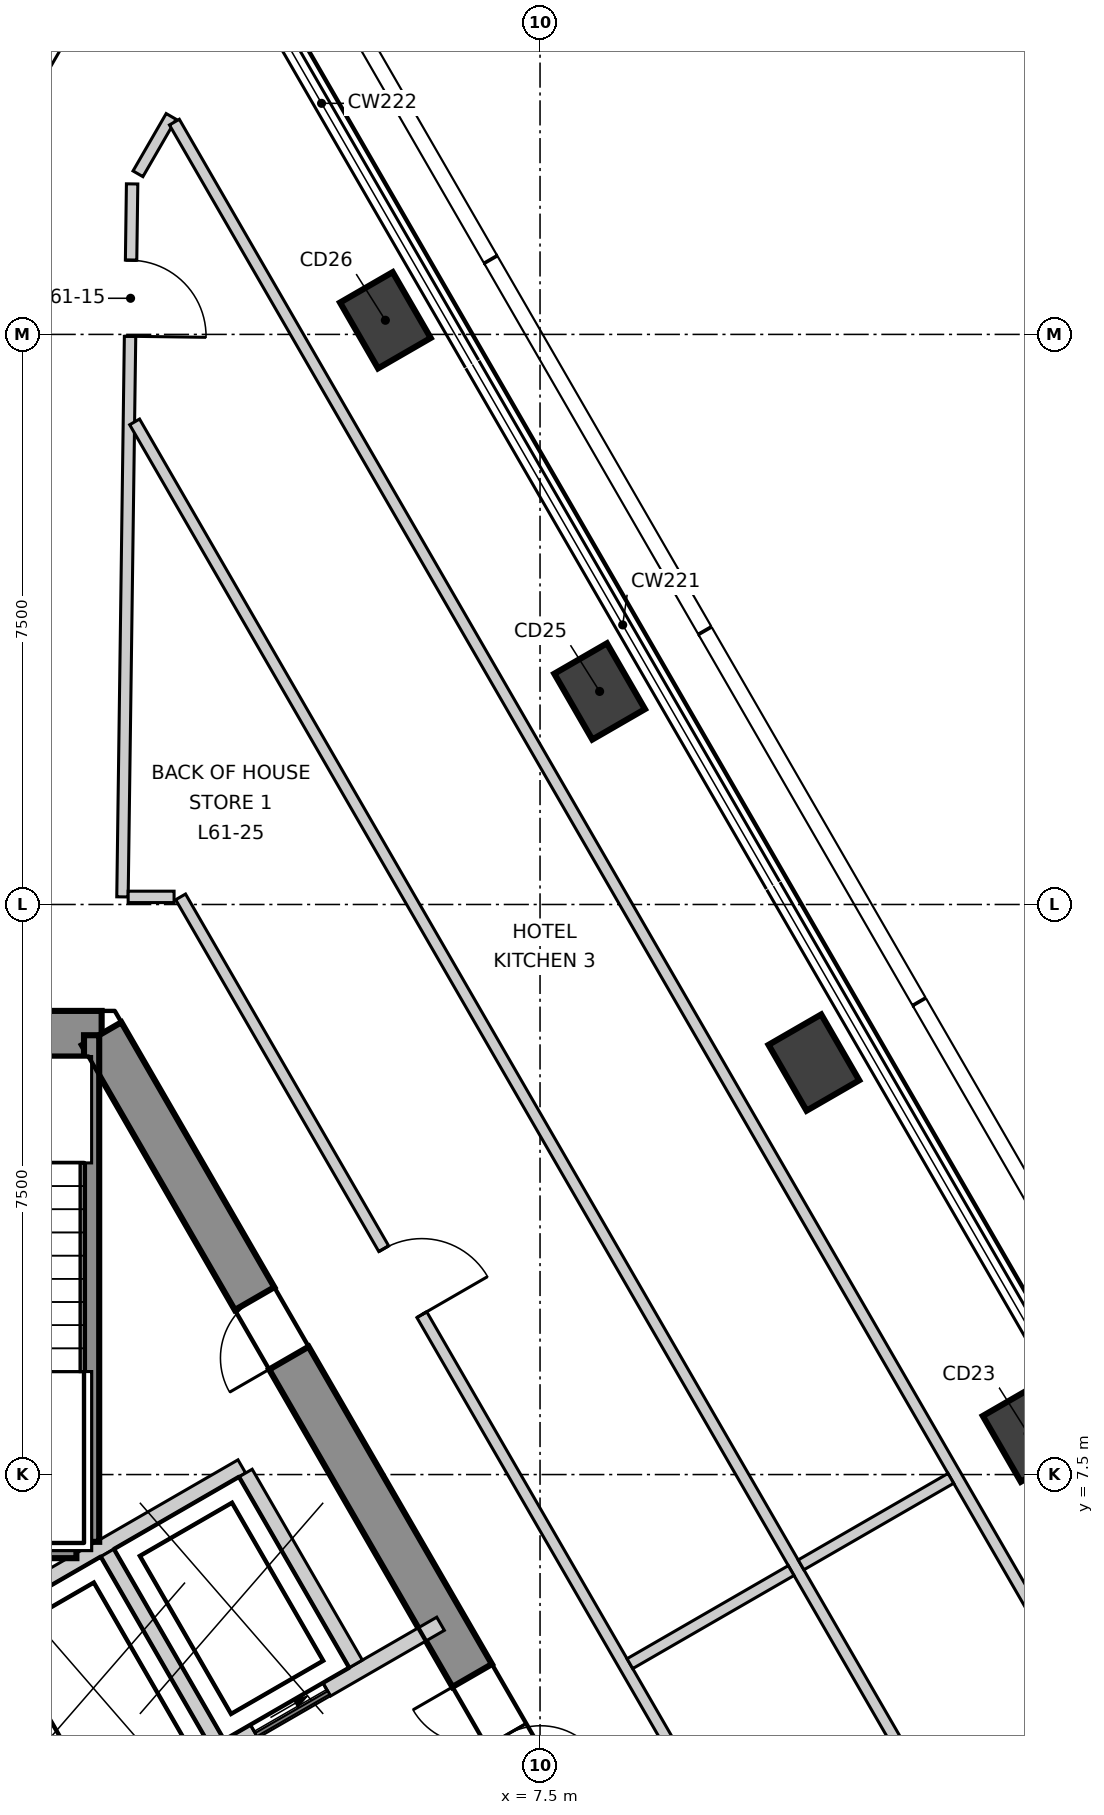
"""IFC4 building model, lengths in metres.
Left out: names, types, materials, properties, quantities, classifications, styles, units other than length and angle.
Written with IfcOpenShell. Run it as: python <this file> out.ifc"""

import sys

from ifc_helpers import new_model, si_unit, direction, frame, frame_2d, origin, origin_2d, place, context, subcontext, project, spatial, polyline, rectangle, outline, extrude, element, fill, save


model = new_model("IFC4")
c1 = context("Model", 3, precision=1e-05, world=origin(), true_north=direction((0.0, 1.0)))
c2 = subcontext(c1, "Body", "Model", "MODEL_VIEW")
j1 = project(units=[si_unit("LENGTHUNIT", "METRE"), si_unit("PLANEANGLEUNIT", "RADIAN")], contexts=[c1])
p1 = place(None, origin())
s1 = spatial("IfcSite", under=j1, at=p1, CompositionType="ELEMENT")
p2 = place(p1, origin())
s2 = spatial("IfcBuilding", under=s1, at=p2, CompositionType="ELEMENT")
p3 = place(p2, frame((0.0, 0.0, 261.8)))
s3 = spatial("IfcBuildingStorey", under=s2, at=p3, CompositionType="ELEMENT", Elevation=261.8)
p4 = place(p3, frame((1.732, 13.3, -0.3), z_axis=(0.0, 0.0, 1.0), x_axis=(-1.0, 0.0, 0.0)))
e1 = element("IfcWall", 1, at=p4, inside=s3, PredefinedType="SHEAR", context=c2, shape_type="SweptSolid", body=[
    extrude(outline(polyline([(-0.173, -0.3), (1.732, -0.3), (3.637, -0.3), (3.291, 0.3), (1.732, 0.3), (0.173, 0.3), (-0.173, -0.3)])), origin(), (0.0, 0.0, 1.0), 6.5),
])
p5 = place(p4, frame((1.032, 0.0, 0.3)))
e2 = element("IfcOpeningElement", 2, at=p5, cuts=e1, PredefinedType="OPENING", context=c2, shape_type="SweptSolid", body=[
    extrude(rectangle(XDim=1.4, YDim=2.1, at=frame_2d((0.7, 1.05))), frame((0.0, 0.31, 0.0), z_axis=(0.0, -1.0, 0.0), x_axis=(1.0, 0.0, 0.0)), (0.0, 0.0, 1.0), 0.62),
])
p6 = place(p3, frame((12.384, -5.15, -0.3), z_axis=(0.0, 0.0, 1.0), x_axis=(-0.500000539815, 0.866025092122, 0.0)))
e3 = element("IfcWall", 3, at=p6, inside=s3, PredefinedType="SHEAR", context=c2, shape_type="SweptSolid", body=[
    extrude(outline(polyline([(-0.173, -0.301), (1.795, -0.301), (3.763, -0.301), (5.731, -0.301), (7.7, -0.301), (9.668, -0.301), (11.636, -0.301), (13.604, -0.3), (15.573, -0.3), (17.541, -0.3), (19.509, -0.3), (21.477, -0.3), (21.131, 0.3), (19.226, 0.3), (17.321, 0.3), (15.415, 0.3), (13.51, 0.3), (11.605, 0.3), (9.699, 0.3), (7.794, 0.3), (5.889, 0.3), (3.984, 0.3), (2.078, 0.3), (0.173, 0.3), (-0.173, -0.301)])), origin(), (0.0, 0.0, 1.0), 6.5),
])
p7 = place(p6, frame((9.752, 0.0, 0.3)))
e4 = element("IfcOpeningElement", 4, at=p7, cuts=e3, PredefinedType="OPENING", context=c2, shape_type="SweptSolid", body=[
    extrude(rectangle(XDim=1.8, YDim=2.1, at=frame_2d((0.9, 1.05))), frame((0.0, 0.31, 0.0), z_axis=(0.0, -1.0, 0.0), x_axis=(1.0, 0.0, 0.0)), (0.0, 0.0, 1.0), 0.621),
])
p8 = place(p6, frame((16.378, 0.0, 0.3)))
e5 = element("IfcOpeningElement", 5, at=p8, cuts=e3, PredefinedType="OPENING", context=c2, shape_type="SweptSolid", body=[
    extrude(rectangle(XDim=0.9, YDim=2.1, at=frame_2d((0.45, 1.05))), frame((0.0, 0.31, 0.0), z_axis=(0.0, -1.0, 0.0), x_axis=(1.0, 0.0, 0.0)), (0.0, 0.0, 1.0), 0.621),
])
for number, where, z_axis, x_axis in (
    (6, (13.922, 8.038, -0.3), (0.0, 0.0, 1.0), (-0.5, 0.866, 0.0)),
    (7, (11.103, 12.92, -0.3), (0.0, 0.0, 1.0), (-0.5, 0.866, 0.0)),
    (8, (8.284, 17.803, -0.3), (0.0, 0.0, 1.0), (-0.5, 0.866, 0.0)),
    (9, (5.465, 22.686, -0.3), (0.0, 0.0, 1.0), (-0.5, 0.866, 0.0)),
):
    element("IfcColumn", number, at=place(p3, frame(where, z_axis=z_axis, x_axis=x_axis)), inside=s3, PredefinedType="COLUMN", context=c2, shape_type="SweptSolid", body=[
        extrude(rectangle(XDim=1.0, YDim=0.8, at=origin_2d()), origin(), (0.0, 0.0, 1.0), 6.5),
    ])
p9 = place(p3, frame((2.006, 15.1, 0.0), z_axis=(0.0, 0.0, 1.0), x_axis=(0.013533377882, 0.999908419648, 0.0)))
e10 = element("IfcWall", 10, at=p9, inside=s3, PredefinedType="PARTITIONING", context=c2, shape_type="SweptSolid", body=[
    extrude(rectangle(XDim=9.381, YDim=0.15, at=frame_2d((4.69, 0.0))), origin(), (0.0, 0.0, 1.0), 5.65),
])
p10 = place(p9, frame((7.376, 0.0, 0.0)))
e11 = element("IfcOpeningElement", 11, at=p10, cuts=e10, PredefinedType="OPENING", context=c2, shape_type="SweptSolid", body=[
    extrude(rectangle(XDim=1.0, YDim=2.1, at=frame_2d((0.5, 1.05))), frame((0.0, 0.085, 0.0), z_axis=(0.0, -1.0, 0.0), x_axis=(1.0, 0.0, 0.0)), (0.0, 0.0, 1.0), 0.17),
])
p11 = place(p3, frame((2.21, 24.613, 0.0), z_axis=(0.0, 0.0, 1.0), x_axis=(0.500174946218, 0.865924374975, 0.0)))
e12 = element("IfcWall", 12, at=p11, inside=s3, PredefinedType="PARTITIONING", context=c2, shape_type="SweptSolid", body=[
    extrude(rectangle(XDim=0.872, YDim=0.15, at=frame_2d((0.436, 0.0))), origin(), (0.0, 0.0, 1.0), 6.2),
])
p12 = place(p3, frame((2.689, 25.293, 0.0), z_axis=(0.0, 0.0, 1.0), x_axis=(0.500022309378, -0.866012523076, 0.0)))
e13 = element("IfcWall", 13, at=p12, inside=s3, PredefinedType="PARTITIONING", context=c2, shape_type="SweptSolid", body=[
    extrude(rectangle(XDim=41.206, YDim=0.15, at=frame_2d((20.603, 0.0))), origin(), (0.0, 0.0, 1.0), 6.2),
])
p13 = place(p3, frame((2.771, 15.1, 0.0), z_axis=(0.0, 0.0, 1.0), x_axis=(0.500017691629, -0.866015189277, 0.0)))
e14 = element("IfcWall", 14, at=p13, inside=s3, PredefinedType="PARTITIONING", context=c2, shape_type="SweptSolid", body=[
    extrude(rectangle(XDim=23.383, YDim=0.15, at=frame_2d((11.691, 0.0))), origin(), (0.0, 0.0, 1.0), 6.2),
])
p14 = place(p13, frame((17.037, 0.0, 0.0)))
e15 = element("IfcOpeningElement", 15, at=p14, cuts=e14, PredefinedType="OPENING", context=c2, shape_type="SweptSolid", body=[
    extrude(rectangle(XDim=1.0, YDim=2.1, at=frame_2d((0.5, 1.05))), frame((0.0, 0.085, 0.0), z_axis=(0.0, -1.0, 0.0), x_axis=(1.0, 0.0, 0.0)), (0.0, 0.0, 1.0), 0.17),
])
p15 = place(p13, frame((5.346, 0.0, 0.0)))
e16 = element("IfcOpeningElement", 16, at=p15, cuts=e14, PredefinedType="OPENING", context=c2, shape_type="SweptSolid", body=[
    extrude(rectangle(XDim=1.0, YDim=2.1, at=frame_2d((0.5, 1.05))), frame((0.0, 0.085, 0.0), z_axis=(0.0, -1.0, 0.0), x_axis=(1.0, 0.0, 0.0)), (0.0, 0.0, 1.0), 0.17),
])
p16 = place(p3, frame((2.081, 15.1, 0.0), z_axis=(0.0, 0.0, 1.0), x_axis=(1.0, 0.0, 0.0)))
e17 = element("IfcWall", 17, at=p16, inside=s3, PredefinedType="PARTITIONING", context=c2, shape_type="SweptSolid", body=[
    extrude(rectangle(XDim=0.604, YDim=0.15, at=frame_2d((0.302, 0.0))), origin(), (0.0, 0.0, 1.0), 6.2),
])
p17 = place(p3, frame((2.166, 21.349, 0.0), z_axis=(0.0, 0.0, 1.0), x_axis=(0.499984980739, -0.866034074985, 0.0)))
e18 = element("IfcWall", 18, at=p17, inside=s3, PredefinedType="PARTITIONING", context=c2, shape_type="SweptSolid", body=[
    extrude(rectangle(XDim=34.991, YDim=0.15, at=frame_2d((17.495, 0.0))), origin(), (0.0, 0.0, 1.0), 6.2),
])
p18 = place(p3, frame((8.682, 5.012, 0.0), z_axis=(0.0, 0.0, 1.0), x_axis=(0.8660395779, 0.499975448907, 0.0)))
e19 = element("IfcWall", 19, at=p18, inside=s3, PredefinedType="PARTITIONING", context=c2, shape_type="SweptSolid", body=[
    extrude(rectangle(XDim=2.45, YDim=0.15, at=frame_2d((1.225, 0.0))), origin(), (0.0, 0.0, 1.0), 5.7),
])
p19 = place(p3, frame((10.934, 6.312, 0.0), z_axis=(0.0, 0.0, 1.0), x_axis=(0.866023021914, 0.500004125498, 0.0)))
e20 = element("IfcWall", 20, at=p19, inside=s3, PredefinedType="PARTITIONING", context=c2, shape_type="SweptSolid", body=[
    extrude(rectangle(XDim=2.276, YDim=0.15, at=frame_2d((1.138, 0.0))), origin(), (0.0, 0.0, 1.0), 5.7),
])
p20 = place(p3, frame((-0.002, 5.541, 0.0), z_axis=(0.0, 0.0, 1.0), x_axis=(0.86600155993, 0.500041296494, 0.0)))
e21 = element("IfcWall", 21, at=p20, inside=s3, PredefinedType="SOLIDWALL", context=c2, shape_type="SweptSolid", body=[
    extrude(rectangle(XDim=4.132, YDim=0.2, at=frame_2d((2.066, 0.0))), origin(), (0.0, 0.0, 1.0), 6.2),
])
p21 = place(p3, frame((0.0, 5.4, 0.0), z_axis=(0.0, 0.0, 1.0), x_axis=(0.500103862429, -0.865965430478, 0.0)))
e22 = element("IfcWall", 22, at=p21, inside=s3, PredefinedType="SOLIDWALL", context=c2, shape_type="SweptSolid", body=[
    extrude(rectangle(XDim=2.973, YDim=0.2, at=frame_2d((1.487, 0.0))), origin(), (0.0, 0.0, 1.0), 6.2),
])
p22 = place(p21, frame((0.937, 0.0, 0.0)))
e23 = element("IfcOpeningElement", 23, at=p22, cuts=e22, PredefinedType="OPENING", context=c2, shape_type="SweptSolid", body=[
    extrude(rectangle(XDim=1.1, YDim=2.1, at=frame_2d((0.55, 1.05))), frame((0.0, 0.11, 0.0), z_axis=(0.0, -1.0, 0.0), x_axis=(1.0, 0.0, 0.0)), (0.0, 0.0, 1.0), 0.22),
])
p23 = place(p3, frame((1.578, 2.874, 0.0), z_axis=(0.0, 0.0, 1.0), x_axis=(0.866045911672, 0.499964477614, 0.0)))
e24 = element("IfcWall", 24, at=p23, inside=s3, PredefinedType="SOLIDWALL", context=c2, shape_type="SweptSolid", body=[
    extrude(rectangle(XDim=5.327, YDim=0.2, at=frame_2d((2.663, 0.0))), origin(), (0.0, 0.0, 1.0), 6.2),
])
p24 = place(p23, frame((2.496, 0.0, 0.0)))
e25 = element("IfcOpeningElement", 25, at=p24, cuts=e24, PredefinedType="OPENING", context=c2, shape_type="SweptSolid", body=[
    extrude(rectangle(XDim=1.1, YDim=2.1, at=frame_2d((0.55, 1.05))), frame((0.0, 0.11, 0.0), z_axis=(0.0, -1.0, 0.0), x_axis=(1.0, 0.0, 0.0)), (0.0, 0.0, 1.0), 0.22),
])
for number, where, z_axis, x_axis in (
    (26, (3.626, 7.52, 0.0), (0.0, 0.0, 1.0), (0.5, -0.866, 0.0)),
    (27, (1.807, 6.47, 0.0), (0.0, 0.0, 1.0), (0.5, -0.866, 0.0)),
):
    element("IfcWall", number, at=place(p3, frame(where, z_axis=z_axis, x_axis=x_axis)), inside=s3, PredefinedType="SOLIDWALL", context=c2, shape_type="SweptSolid", body=[
        extrude(rectangle(XDim=2.9, YDim=0.2, at=frame_2d((1.45, 0.0))), origin(), (0.0, 0.0, 1.0), 6.2),
    ])
p25 = place(p3, frame((1.6, 6.615, 0.0), z_axis=(0.0, 0.0, 1.0), x_axis=(0.0, 1.0, 0.0)))
e28 = element("IfcWall", 28, at=p25, inside=s3, PredefinedType="SOLIDWALL", context=c2, shape_type="SweptSolid", body=[
    extrude(rectangle(XDim=6.665, YDim=0.2, at=frame_2d((3.333, 0.0))), origin(), (0.0, 0.0, 1.0), 6.2),
])
p26 = place(p3, frame((-1.4, 6.5, 0.0), z_axis=(0.0, 0.0, 1.0), x_axis=(1.0, 0.0, 0.0)))
e29 = element("IfcWall", 29, at=p26, inside=s3, PredefinedType="SOLIDWALL", context=c2, shape_type="SweptSolid", body=[
    extrude(rectangle(XDim=2.8, YDim=0.2, at=frame_2d((1.4, 0.0))), origin(), (0.0, 0.0, 1.0), 6.2),
])
p27 = place(p24, origin())
e30 = element("IfcDoor", 30, at=p27, inside=s3, OperationType="SLIDING_TO_LEFT", PredefinedType="DOOR", context=c2, shape_type="SweptSolid", body=[
    extrude(rectangle(XDim=1.1, YDim=2.1, at=frame_2d((0.55, 1.05))), frame((0.0, 0.025, 0.0), z_axis=(0.0, -1.0, 0.0), x_axis=(1.0, 0.0, 0.0)), (0.0, 0.0, 1.0), 0.05),
])
fill(e25, e30)
p28 = place(p15, origin())
e31 = element("IfcDoor", 31, at=p28, inside=s3, OperationType="SINGLE_SWING_LEFT", PredefinedType="DOOR", context=c2, shape_type="SweptSolid", body=[
    extrude(rectangle(XDim=1.0, YDim=2.1, at=frame_2d((0.5, 1.05))), frame((0.0, 0.025, 0.0), z_axis=(0.0, -1.0, 0.0), x_axis=(1.0, 0.0, 0.0)), (0.0, 0.0, 1.0), 0.05),
])
fill(e16, e31)
p29 = place(p10, origin())
e32 = element("IfcDoor", 32, at=p29, inside=s3, OperationType="SINGLE_SWING_LEFT", PredefinedType="DOOR", context=c2, shape_type="SweptSolid", body=[
    extrude(rectangle(XDim=1.0, YDim=2.1, at=frame_2d((0.5, 1.05))), frame((0.0, 0.025, 0.0), z_axis=(0.0, -1.0, 0.0), x_axis=(1.0, 0.0, 0.0)), (0.0, 0.0, 1.0), 0.05),
])
fill(e11, e32)
p30 = place(p7, origin())
e33 = element("IfcDoor", 33, at=p30, inside=s3, OperationType="DOUBLE_DOOR_SINGLE_SWING", PredefinedType="DOOR", context=c2, shape_type="SweptSolid", body=[
    extrude(rectangle(XDim=1.8, YDim=2.1, at=frame_2d((0.9, 1.05))), frame((0.0, 0.025, 0.0), z_axis=(0.0, -1.0, 0.0), x_axis=(1.0, 0.0, 0.0)), (0.0, 0.0, 1.0), 0.05),
])
fill(e4, e33)
p31 = place(p8, origin())
e34 = element("IfcDoor", 34, at=p31, inside=s3, OperationType="SINGLE_SWING_RIGHT", PredefinedType="DOOR", context=c2, shape_type="SweptSolid", body=[
    extrude(rectangle(XDim=0.9, YDim=2.1, at=frame_2d((0.45, 1.05))), frame((0.0, 0.025, 0.0), z_axis=(0.0, -1.0, 0.0), x_axis=(1.0, 0.0, 0.0)), (0.0, 0.0, 1.0), 0.05),
])
fill(e5, e34)
save(model, sys.argv[1])
